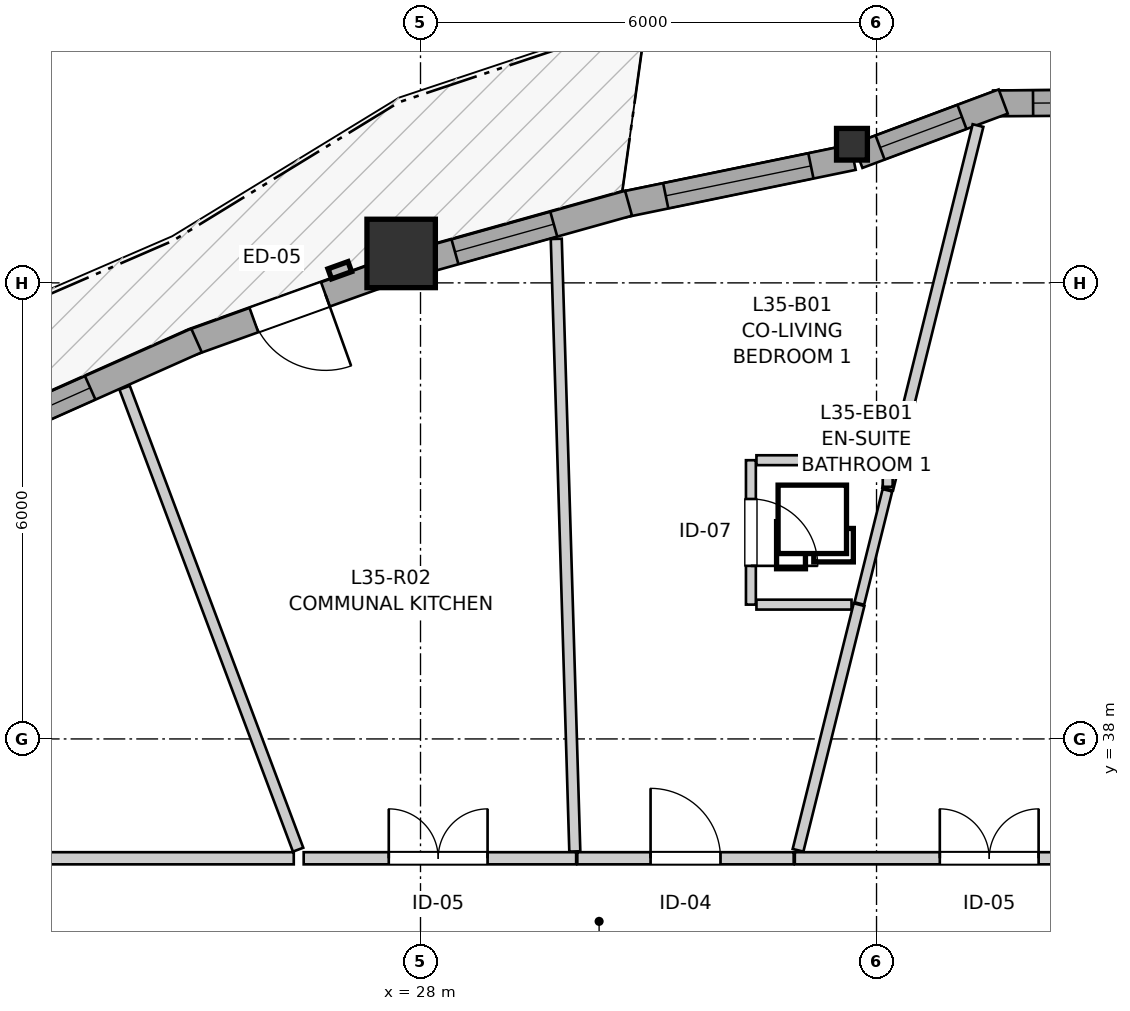
"""IFC4 building model, lengths in metres.
Left out: names, types, materials, properties, quantities, classifications, styles, units other than length and angle.
Written with IfcOpenShell. Run it as: python <this file> out.ifc"""

import sys

from ifc_helpers import new_model, si_unit, direction, frame, frame_2d, origin, origin_2d, place, context, subcontext, project, spatial, rectangle, i_section, extrude, source, transform, mapped, element, fill, save


model = new_model("IFC4")
c1 = context("Model", 3, precision=1e-05, world=origin(), true_north=direction((0.0, 1.0)))
c2 = subcontext(c1, "Body", "Model", "MODEL_VIEW")
j1 = project(units=[si_unit("LENGTHUNIT", "METRE"), si_unit("PLANEANGLEUNIT", "RADIAN")], contexts=[c1])
p1 = place(None, origin())
s1 = spatial("IfcSite", under=j1, at=p1, CompositionType="ELEMENT")
p2 = place(p1, origin())
s2 = spatial("IfcBuilding", under=s1, at=p2, CompositionType="ELEMENT")
p3 = place(p2, frame((0.0, 0.0, 118.4)))
s3 = spatial("IfcBuildingStorey", under=s2, at=p3, CompositionType="ELEMENT", Elevation=118.4)
m1 = source(origin(), c2, "Body", "SweptSolid", [
    extrude(i_section(OverallWidth=0.406, OverallDepth=0.416, WebThickness=0.027, FlangeThickness=0.044, FilletRadius=0.015, at=origin_2d()), origin(), (0.0, 0.0, 1.0), 2.95),
])
p4 = place(p3, frame((33.677, 45.824, 0.0), z_axis=(0.0, 0.0, 1.0), x_axis=(1.0, 0.0, 0.0)))
e1 = element("IfcColumn", 1, at=p4, inside=s3, PredefinedType="PILASTER", context=c2, shape_type="MappedRepresentation", body=[
    mapped(m1, transform((0.0, 0.0, 0.0), x_axis=(1.0, 0.0, 0.0), y_axis=(0.0, 1.0, 0.0), z_axis=(0.0, 0.0, 1.0), scale=1.0)),
])
m2 = source(origin(), c2, "Body", "SweptSolid", [
    extrude(rectangle(XDim=0.9, YDim=0.9, at=origin_2d()), origin(), (0.0, 0.0, 1.0), 2.95),
])
p5 = place(p3, frame((27.746, 44.387, 0.0), z_axis=(0.0, 0.0, 1.0), x_axis=(1.0, 0.0, 0.0)))
e2 = element("IfcColumn", 2, at=p5, inside=s3, PredefinedType="COLUMN", context=c2, shape_type="MappedRepresentation", body=[
    mapped(m2, transform((0.0, 0.0, 0.0), x_axis=(1.0, 0.0, 0.0), y_axis=(0.0, 1.0, 0.0), z_axis=(0.0, 0.0, 1.0), scale=1.0)),
])
p6 = place(p3, frame((37.634, 46.376, 0.0), z_axis=(0.0, 0.0, 1.0), x_axis=(-0.999976456891, -0.00686189939, 0.0)))
e3 = element("IfcWall", 3, at=p6, inside=s3, PredefinedType="SOLIDWALL", context=c2, shape_type="SweptSolid", body=[
    extrude(rectangle(XDim=2.099, YDim=0.34, at=frame_2d((1.05, 0.0))), origin(), (0.0, 0.0, 1.0), 2.48),
])
p7 = place(p6, frame((0.524, 0.0, 0.82)))
e4 = element("IfcOpeningElement", 4, at=p7, cuts=e3, PredefinedType="OPENING", context=c2, shape_type="SweptSolid", body=[
    extrude(rectangle(XDim=1.05, YDim=1.45, at=frame_2d((0.525, 0.725))), frame((0.0, 0.18, 0.0), z_axis=(0.0, -1.0, 0.0), x_axis=(1.0, 0.0, 0.0)), (0.0, 0.0, 1.0), 0.36),
])
p8 = place(p3, frame((35.667, 46.386, 0.0), z_axis=(0.0, 0.0, 1.0), x_axis=(-0.936761017964, -0.34996970615, 0.0)))
e5 = element("IfcWall", 5, at=p8, inside=s3, PredefinedType="SOLIDWALL", context=c2, shape_type="SweptSolid", body=[
    extrude(rectangle(XDim=2.041, YDim=0.34, at=frame_2d((1.021, 0.0))), origin(), (0.0, 0.0, 1.0), 2.48),
])
p9 = place(p8, frame((0.579, 0.0, 0.82)))
e6 = element("IfcOpeningElement", 6, at=p9, cuts=e5, PredefinedType="OPENING", context=c2, shape_type="SweptSolid", body=[
    extrude(rectangle(XDim=1.15, YDim=1.2, at=frame_2d((0.575, 0.6))), frame((0.0, 0.18, 0.0), z_axis=(0.0, -1.0, 0.0), x_axis=(1.0, 0.0, 0.0)), (0.0, 0.0, 1.0), 0.36),
])
p10 = place(p3, frame((33.691, 45.653, 0.0), z_axis=(0.0, 0.0, 1.0), x_axis=(-0.979414063846, -0.201861565287, 0.0)))
e7 = element("IfcWall", 7, at=p10, inside=s3, PredefinedType="SOLIDWALL", context=c2, shape_type="SweptSolid", body=[
    extrude(rectangle(XDim=3.104, YDim=0.34, at=frame_2d((1.552, 0.0))), origin(), (0.0, 0.0, 1.0), 2.48),
])
p11 = place(p10, frame((0.567, 0.0, 0.82)))
e8 = element("IfcOpeningElement", 8, at=p11, cuts=e7, PredefinedType="OPENING", context=c2, shape_type="SweptSolid", body=[
    extrude(rectangle(XDim=1.95, YDim=1.4, at=frame_2d((0.975, 0.7))), frame((0.0, 0.18, 0.0), z_axis=(0.0, -1.0, 0.0), x_axis=(1.0, 0.0, 0.0)), (0.0, 0.0, 1.0), 0.36),
])
p12 = place(p3, frame((30.737, 45.048, 0.0), z_axis=(0.0, 0.0, 1.0), x_axis=(-0.963026728711, -0.26940586443, 0.0)))
e9 = element("IfcWall", 9, at=p12, inside=s3, PredefinedType="SOLIDWALL", context=c2, shape_type="SweptSolid", body=[
    extrude(rectangle(XDim=2.829, YDim=0.34, at=frame_2d((1.415, 0.0))), origin(), (0.0, 0.0, 1.0), 2.48),
])
p13 = place(p12, frame((1.021, 0.0, 0.82)))
e10 = element("IfcOpeningElement", 10, at=p13, cuts=e9, PredefinedType="OPENING", context=c2, shape_type="SweptSolid", body=[
    extrude(rectangle(XDim=1.35, YDim=1.45, at=frame_2d((0.675, 0.725))), frame((0.0, 0.18, 0.0), z_axis=(0.0, -1.0, 0.0), x_axis=(1.0, 0.0, 0.0)), (0.0, 0.0, 1.0), 0.36),
])
p14 = place(p3, frame((27.586, 44.149, 0.0), z_axis=(0.0, 0.0, 1.0), x_axis=(-0.941112277287, -0.338094190338, 0.0)))
e11 = element("IfcWall", 11, at=p14, inside=s3, PredefinedType="SOLIDWALL", context=c2, shape_type="SweptSolid", body=[
    extrude(rectangle(XDim=2.779, YDim=0.34, at=frame_2d((1.39, 0.0))), origin(), (0.0, 0.0, 1.0), 2.48),
])
p15 = place(p14, frame((0.89, 0.0, 0.0)))
e12 = element("IfcOpeningElement", 12, at=p15, cuts=e11, PredefinedType="OPENING", context=c2, shape_type="SweptSolid", body=[
    extrude(rectangle(XDim=1.0, YDim=2.1, at=frame_2d((0.5, 1.05))), frame((0.0, 0.18, 0.0), z_axis=(0.0, -1.0, 0.0), x_axis=(1.0, 0.0, 0.0)), (0.0, 0.0, 1.0), 0.36),
])
p16 = place(p3, frame((25.053, 43.243, 0.0), z_axis=(0.0, 0.0, 1.0), x_axis=(-0.91339900063, -0.407065431655, 0.0)))
e13 = element("IfcWall", 13, at=p16, inside=s3, PredefinedType="SOLIDWALL", context=c2, shape_type="SweptSolid", body=[
    extrude(rectangle(XDim=2.956, YDim=0.34, at=frame_2d((1.478, 0.0))), origin(), (0.0, 0.0, 1.0), 2.48),
])
p17 = place(p16, frame((1.531, 0.0, 0.82)))
e14 = element("IfcOpeningElement", 14, at=p17, cuts=e13, PredefinedType="OPENING", context=c2, shape_type="SweptSolid", body=[
    extrude(rectangle(XDim=0.95, YDim=1.35, at=frame_2d((0.475, 0.675))), frame((0.0, 0.18, 0.0), z_axis=(0.0, -1.0, 0.0), x_axis=(1.0, 0.0, 0.0)), (0.0, 0.0, 1.0), 0.36),
])
p18 = place(p3, frame((32.925, 36.43, 0.0), z_axis=(0.0, 0.0, 1.0), x_axis=(1.0, 0.0, 0.0)))
e15 = element("IfcWall", 15, at=p18, inside=s3, PredefinedType="PARTITIONING", context=c2, shape_type="SweptSolid", body=[
    extrude(rectangle(XDim=5.118, YDim=0.16, at=frame_2d((2.559, 0.0))), origin(), (0.0, 0.0, 1.0), 2.588),
])
p19 = place(p18, frame((1.907, 0.0, 0.0)))
e16 = element("IfcOpeningElement", 16, at=p19, cuts=e15, PredefinedType="OPENING", context=c2, shape_type="SweptSolid", body=[
    extrude(rectangle(XDim=1.3, YDim=2.1, at=frame_2d((0.65, 1.05))), frame((0.0, 0.09, 0.0), z_axis=(0.0, -1.0, 0.0), x_axis=(1.0, 0.0, 0.0)), (0.0, 0.0, 1.0), 0.18),
])
p20 = place(p3, frame((26.463, 36.43, 0.0), z_axis=(0.0, 0.0, 1.0), x_axis=(1.0, 0.0, 0.0)))
e17 = element("IfcWall", 17, at=p20, inside=s3, PredefinedType="PARTITIONING", context=c2, shape_type="SweptSolid", body=[
    extrude(rectangle(XDim=3.585, YDim=0.16, at=frame_2d((1.792, 0.0))), origin(), (0.0, 0.0, 1.0), 2.95),
])
p21 = place(p20, frame((1.119, 0.0, 0.0)))
e18 = element("IfcOpeningElement", 18, at=p21, cuts=e17, PredefinedType="OPENING", context=c2, shape_type="SweptSolid", body=[
    extrude(rectangle(XDim=1.3, YDim=2.1, at=frame_2d((0.65, 1.05))), frame((0.0, 0.09, 0.0), z_axis=(0.0, -1.0, 0.0), x_axis=(1.0, 0.0, 0.0)), (0.0, 0.0, 1.0), 0.18),
])
p22 = place(p3, frame((30.063, 36.43, 0.0), z_axis=(0.0, 0.0, 1.0), x_axis=(1.0, 0.0, 0.0)))
e19 = element("IfcWall", 19, at=p22, inside=s3, PredefinedType="PARTITIONING", context=c2, shape_type="SweptSolid", body=[
    extrude(rectangle(XDim=2.847, YDim=0.16, at=frame_2d((1.423, 0.0))), origin(), (0.0, 0.0, 1.0), 2.95),
])
p23 = place(p22, frame((0.964, 0.0, 0.0)))
e20 = element("IfcOpeningElement", 20, at=p23, cuts=e19, PredefinedType="OPENING", context=c2, shape_type="SweptSolid", body=[
    extrude(rectangle(XDim=0.92, YDim=2.1, at=frame_2d((0.46, 1.05))), frame((0.0, 0.09, 0.0), z_axis=(0.0, -1.0, 0.0), x_axis=(1.0, 0.0, 0.0)), (0.0, 0.0, 1.0), 0.18),
])
p24 = place(p3, frame((32.347, 41.667, 0.0), z_axis=(0.0, 0.0, 1.0), x_axis=(0.0, -1.0, 0.0)))
e21 = element("IfcWall", 21, at=p24, inside=s3, PredefinedType="PARTITIONING", context=c2, shape_type="SweptSolid", body=[
    extrude(rectangle(XDim=1.9, YDim=0.13, at=frame_2d((0.95, 0.0))), origin(), (0.0, 0.0, 1.0), 2.95),
])
p25 = place(p24, frame((0.51, 0.0, 0.0)))
e22 = element("IfcOpeningElement", 22, at=p25, cuts=e21, PredefinedType="OPENING", context=c2, shape_type="SweptSolid", body=[
    extrude(rectangle(XDim=0.88, YDim=2.05, at=frame_2d((0.44, 1.025))), frame((0.0, 0.075, 0.0), z_axis=(0.0, -1.0, 0.0), x_axis=(1.0, 0.0, 0.0)), (0.0, 0.0, 1.0), 0.15),
])
p26 = place(p3, frame((29.786, 44.579, 0.0), z_axis=(0.0, 0.0, 1.0), x_axis=(0.030281792334, -0.99954140137, 0.0)))
e23 = element("IfcWall", 23, at=p26, inside=s3, PredefinedType="PARTITIONING", context=c2, shape_type="SweptSolid", body=[
    extrude(rectangle(XDim=8.062, YDim=0.145, at=frame_2d((4.031, 0.0))), origin(), (0.0, 0.0, 1.0), 2.95),
])
p27 = place(p3, frame((24.107, 42.621, 0.0), z_axis=(0.0, 0.0, 1.0), x_axis=(0.351605509999, -0.93614826034, 0.0)))
e24 = element("IfcWall", 24, at=p27, inside=s3, PredefinedType="PARTITIONING", context=c2, shape_type="SweptSolid", body=[
    extrude(rectangle(XDim=6.493, YDim=0.145, at=frame_2d((3.247, 0.0))), origin(), (0.0, 0.0, 1.0), 2.95),
])
p28 = place(p3, frame((34.147, 41.286, 0.0), z_axis=(0.0, 0.0, 1.0), x_axis=(0.241055314039, 0.970511378384, 0.0)))
e25 = element("IfcWall", 25, at=p28, inside=s3, PredefinedType="PARTITIONING", context=c2, shape_type="SweptSolid", body=[
    extrude(rectangle(XDim=4.929, YDim=0.145, at=frame_2d((2.465, 0.0))), origin(), (0.0, 0.0, 1.0), 2.95),
])
p29 = place(p3, frame((22.258, 36.43, 0.0), z_axis=(0.0, 0.0, 1.0), x_axis=(1.0, 0.0, 0.0)))
e26 = element("IfcWall", 26, at=p29, inside=s3, PredefinedType="PARTITIONING", context=c2, shape_type="SweptSolid", body=[
    extrude(rectangle(XDim=4.074, YDim=0.16, at=frame_2d((2.037, 0.0))), origin(), (0.0, 0.0, 1.0), 2.588),
])
p30 = place(p3, frame((32.967, 36.535, 0.0), z_axis=(0.0, 0.0, 1.0), x_axis=(0.241120890255, 0.970495088232, 0.0)))
e27 = element("IfcWall", 27, at=p30, inside=s3, PredefinedType="PARTITIONING", context=c2, shape_type="SweptSolid", body=[
    extrude(rectangle(XDim=3.33, YDim=0.145, at=frame_2d((1.665, 0.0))), origin(), (0.0, 0.0, 1.0), 2.95),
])
p31 = place(p3, frame((32.42, 41.667, 0.0), z_axis=(0.0, 0.0, 1.0), x_axis=(1.0, 0.0, 0.0)))
e28 = element("IfcWall", 28, at=p31, inside=s3, PredefinedType="PARTITIONING", context=c2, shape_type="SweptSolid", body=[
    extrude(rectangle(XDim=1.628, YDim=0.13, at=frame_2d((0.814, 0.0))), origin(), (0.0, 0.0, 1.0), 2.95),
])
p32 = place(p3, frame((33.774, 39.781, 0.0), z_axis=(0.0, 0.0, 1.0), x_axis=(0.240776504653, 0.970580586457, 0.0)))
e29 = element("IfcWall", 29, at=p32, inside=s3, PredefinedType="PARTITIONING", context=c2, shape_type="SweptSolid", body=[
    extrude(rectangle(XDim=1.535, YDim=0.13, at=frame_2d((0.768, 0.0))), origin(), (0.0, 0.0, 1.0), 2.95),
])
p33 = place(p3, frame((32.42, 39.767, 0.0), z_axis=(0.0, 0.0, 1.0), x_axis=(1.0, 0.0, 0.0)))
e30 = element("IfcWall", 30, at=p33, inside=s3, PredefinedType="PARTITIONING", context=c2, shape_type="SweptSolid", body=[
    extrude(rectangle(XDim=1.251, YDim=0.13, at=frame_2d((0.625, 0.0))), origin(), (0.0, 0.0, 1.0), 2.95),
])
p34 = place(p3, frame((34.147, 41.317, 0.0), z_axis=(0.0, 0.0, 1.0), x_axis=(0.0, 1.0, 0.0)))
e31 = element("IfcWall", 31, at=p34, inside=s3, PredefinedType="PARTITIONING", context=c2, shape_type="SweptSolid", body=[
    extrude(rectangle(XDim=0.35, YDim=0.13, at=frame_2d((0.175, 0.0))), origin(), (0.0, 0.0, 1.0), 2.95),
])
m3 = source(origin(), c2, "Body", "SweptSolid", [
    extrude(rectangle(XDim=1.05, YDim=1.45, at=frame_2d((0.525, 0.725))), frame((0.0, 0.03, 0.0), z_axis=(0.0, -1.0, 0.0), x_axis=(1.0, 0.0, 0.0)), (0.0, 0.0, 1.0), 0.06),
])
p35 = place(p7, origin())
e32 = element("IfcWindow", 32, at=p35, inside=s3, PartitioningType="SINGLE_PANEL", PredefinedType="WINDOW", context=c2, shape_type="MappedRepresentation", body=[
    mapped(m3, transform((0.0, 0.0, 0.0), x_axis=(1.0, 0.0, 0.0), y_axis=(0.0, 1.0, 0.0), z_axis=(0.0, 0.0, 1.0), scale=1.0)),
])
fill(e4, e32)
m4 = source(origin(), c2, "Body", "SweptSolid", [
    extrude(rectangle(XDim=1.15, YDim=1.2, at=frame_2d((0.575, 0.6))), frame((0.0, 0.03, 0.0), z_axis=(0.0, -1.0, 0.0), x_axis=(1.0, 0.0, 0.0)), (0.0, 0.0, 1.0), 0.06),
])
p36 = place(p9, origin())
e33 = element("IfcWindow", 33, at=p36, inside=s3, PartitioningType="SINGLE_PANEL", PredefinedType="WINDOW", context=c2, shape_type="MappedRepresentation", body=[
    mapped(m4, transform((0.0, 0.0, 0.0), x_axis=(1.0, 0.0, 0.0), y_axis=(0.0, 1.0, 0.0), z_axis=(0.0, 0.0, 1.0), scale=1.0)),
])
fill(e6, e33)
m5 = source(origin(), c2, "Body", "SweptSolid", [
    extrude(rectangle(XDim=1.95, YDim=1.4, at=frame_2d((0.975, 0.7))), frame((0.0, 0.03, 0.0), z_axis=(0.0, -1.0, 0.0), x_axis=(1.0, 0.0, 0.0)), (0.0, 0.0, 1.0), 0.06),
])
p37 = place(p11, origin())
e34 = element("IfcWindow", 34, at=p37, inside=s3, PartitioningType="SINGLE_PANEL", PredefinedType="WINDOW", context=c2, shape_type="MappedRepresentation", body=[
    mapped(m5, transform((0.0, 0.0, 0.0), x_axis=(1.0, 0.0, 0.0), y_axis=(0.0, 1.0, 0.0), z_axis=(0.0, 0.0, 1.0), scale=1.0)),
])
fill(e8, e34)
m6 = source(origin(), c2, "Body", "SweptSolid", [
    extrude(rectangle(XDim=1.35, YDim=1.45, at=frame_2d((0.675, 0.725))), frame((0.0, 0.03, 0.0), z_axis=(0.0, -1.0, 0.0), x_axis=(1.0, 0.0, 0.0)), (0.0, 0.0, 1.0), 0.06),
])
p38 = place(p13, origin())
e35 = element("IfcWindow", 35, at=p38, inside=s3, PartitioningType="SINGLE_PANEL", PredefinedType="WINDOW", context=c2, shape_type="MappedRepresentation", body=[
    mapped(m6, transform((0.0, 0.0, 0.0), x_axis=(1.0, 0.0, 0.0), y_axis=(0.0, 1.0, 0.0), z_axis=(0.0, 0.0, 1.0), scale=1.0)),
])
fill(e10, e35)
m7 = source(origin(), c2, "Body", "SweptSolid", [
    extrude(rectangle(XDim=0.95, YDim=1.35, at=frame_2d((0.475, 0.675))), frame((0.0, 0.03, 0.0), z_axis=(0.0, -1.0, 0.0), x_axis=(1.0, 0.0, 0.0)), (0.0, 0.0, 1.0), 0.06),
])
p39 = place(p17, origin())
e36 = element("IfcWindow", 36, at=p39, inside=s3, PartitioningType="SINGLE_PANEL", PredefinedType="WINDOW", context=c2, shape_type="MappedRepresentation", body=[
    mapped(m7, transform((0.0, 0.0, 0.0), x_axis=(1.0, 0.0, 0.0), y_axis=(0.0, 1.0, 0.0), z_axis=(0.0, 0.0, 1.0), scale=1.0)),
])
fill(e14, e36)
m8 = source(origin(), c2, "Body", "SweptSolid", [
    extrude(rectangle(XDim=1.0, YDim=2.1, at=frame_2d((0.5, 1.05))), frame((0.0, 0.025, 0.0), z_axis=(0.0, -1.0, 0.0), x_axis=(1.0, 0.0, 0.0)), (0.0, 0.0, 1.0), 0.05),
])
p40 = place(p15, origin())
e37 = element("IfcDoor", 37, at=p40, inside=s3, OperationType="SINGLE_SWING_LEFT", PredefinedType="DOOR", context=c2, shape_type="MappedRepresentation", body=[
    mapped(m8, transform((0.0, 0.0, 0.0), x_axis=(1.0, 0.0, 0.0), y_axis=(0.0, 1.0, 0.0), z_axis=(0.0, 0.0, 1.0), scale=1.0)),
])
fill(e12, e37)
m9 = source(origin(), c2, "Body", "SweptSolid", [
    extrude(rectangle(XDim=1.3, YDim=2.1, at=frame_2d((0.65, 1.05))), frame((0.0, 0.025, 0.0), z_axis=(0.0, -1.0, 0.0), x_axis=(1.0, 0.0, 0.0)), (0.0, 0.0, 1.0), 0.05),
])
p41 = place(p19, origin())
e38 = element("IfcDoor", 38, at=p41, inside=s3, OperationType="DOUBLE_DOOR_SINGLE_SWING", PredefinedType="DOOR", context=c2, shape_type="MappedRepresentation", body=[
    mapped(m9, transform((0.0, 0.0, 0.0), x_axis=(1.0, 0.0, 0.0), y_axis=(0.0, 1.0, 0.0), z_axis=(0.0, 0.0, 1.0), scale=1.0)),
])
fill(e16, e38)
p42 = place(p21, origin())
e39 = element("IfcDoor", 39, at=p42, inside=s3, OperationType="DOUBLE_DOOR_SINGLE_SWING", PredefinedType="DOOR", context=c2, shape_type="MappedRepresentation", body=[
    mapped(m9, transform((0.0, 0.0, 0.0), x_axis=(1.0, 0.0, 0.0), y_axis=(0.0, 1.0, 0.0), z_axis=(0.0, 0.0, 1.0), scale=1.0)),
])
fill(e18, e39)
m10 = source(origin(), c2, "Body", "SweptSolid", [
    extrude(rectangle(XDim=0.92, YDim=2.1, at=frame_2d((0.46, 1.05))), frame((0.0, 0.025, 0.0), z_axis=(0.0, -1.0, 0.0), x_axis=(1.0, 0.0, 0.0)), (0.0, 0.0, 1.0), 0.05),
])
p43 = place(p23, origin())
e40 = element("IfcDoor", 40, at=p43, inside=s3, OperationType="SINGLE_SWING_LEFT", PredefinedType="DOOR", context=c2, shape_type="MappedRepresentation", body=[
    mapped(m10, transform((0.0, 0.0, 0.0), x_axis=(1.0, 0.0, 0.0), y_axis=(0.0, 1.0, 0.0), z_axis=(0.0, 0.0, 1.0), scale=1.0)),
])
fill(e20, e40)
m11 = source(origin(), c2, "Body", "SweptSolid", [
    extrude(rectangle(XDim=0.88, YDim=2.05, at=frame_2d((0.44, 1.025))), frame((0.0, 0.025, 0.0), z_axis=(0.0, -1.0, 0.0), x_axis=(1.0, 0.0, 0.0)), (0.0, 0.0, 1.0), 0.05),
])
p44 = place(p25, origin())
e41 = element("IfcDoor", 41, at=p44, inside=s3, OperationType="SINGLE_SWING_RIGHT", PredefinedType="DOOR", context=c2, shape_type="MappedRepresentation", body=[
    mapped(m11, transform((0.0, 0.0, 0.0), x_axis=(1.0, 0.0, 0.0), y_axis=(0.0, 1.0, 0.0), z_axis=(0.0, 0.0, 1.0), scale=1.0)),
])
fill(e22, e41)
save(model, sys.argv[1])
